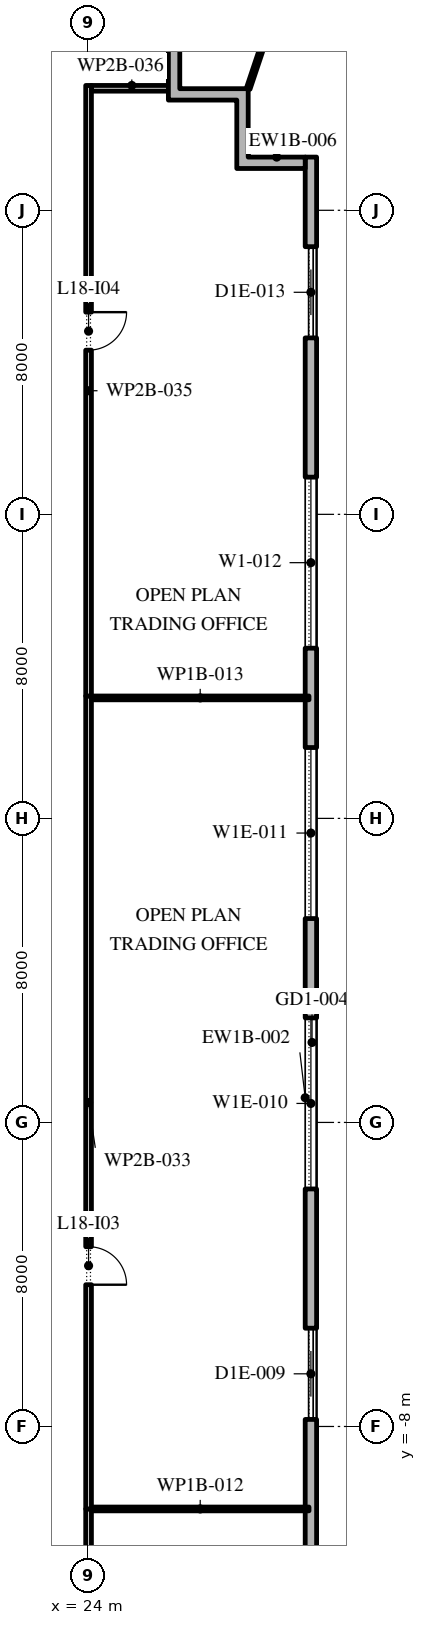
"""IFC4 building model, lengths in metres.
Left out: names, types, materials, properties, quantities, classifications, styles, units other than length and angle.
Written with IfcOpenShell. Run it as: python <this file> out.ifc"""

import sys

from ifc_helpers import new_model, si_unit, direction, frame, frame_2d, origin, place, context, subcontext, project, spatial, polyline, rectangle, outline, extrude, element, fill, save


model = new_model("IFC4")
c1 = context("Model", 3, precision=1e-05, world=origin(), true_north=direction((0.0, 1.0)))
c2 = subcontext(c1, "Body", "Model", "MODEL_VIEW")
j1 = project(units=[si_unit("LENGTHUNIT", "METRE"), si_unit("PLANEANGLEUNIT", "RADIAN")], contexts=[c1])
p1 = place(None, origin())
s1 = spatial("IfcSite", under=j1, at=p1, CompositionType="ELEMENT")
p2 = place(p1, origin())
s2 = spatial("IfcBuilding", under=s1, at=p2, CompositionType="ELEMENT")
p3 = place(p2, frame((0.0, 0.0, 85.8)))
s3 = spatial("IfcBuildingStorey", under=s2, at=p3, CompositionType="ELEMENT", Elevation=85.8)
p4 = place(p3, frame((29.85, -24.1, 0.0), z_axis=(0.0, 0.0, 1.0), x_axis=(0.0, 1.0, 0.0)))
e1 = element("IfcWall", 1, at=p4, inside=s3, PredefinedType="STANDARD", context=c2, shape_type="SweptSolid", body=[
    extrude(rectangle(XDim=49.5, YDim=0.3, at=frame_2d((24.75, 0.0))), origin(), (0.0, 0.0, 1.0), 3.95),
])
p5 = place(p4, frame((1.157, 0.0, 0.45)))
e2 = element("IfcOpeningElement", 2, at=p5, cuts=e1, PredefinedType="OPENING", context=c2, shape_type="SweptSolid", body=[
    extrude(rectangle(XDim=4.5, YDim=3.05, at=frame_2d((2.25, 1.525))), frame((0.0, 0.16, 0.0), z_axis=(0.0, -1.0, 0.0), x_axis=(1.0, 0.0, 0.0)), (0.0, 0.0, 1.0), 0.32),
])
p6 = place(p4, frame((8.121, 0.0, 0.45)))
e3 = element("IfcOpeningElement", 3, at=p6, cuts=e1, PredefinedType="OPENING", context=c2, shape_type="SweptSolid", body=[
    extrude(rectangle(XDim=4.5, YDim=2.775, at=frame_2d((2.25, 1.387))), frame((0.0, 0.16, 0.0), z_axis=(0.0, -1.0, 0.0), x_axis=(1.0, 0.0, 0.0)), (0.0, 0.0, 1.0), 0.32),
])
p7 = place(p4, frame((16.286, 0.0, 0.0)))
e4 = element("IfcOpeningElement", 4, at=p7, cuts=e1, PredefinedType="OPENING", context=c2, shape_type="SweptSolid", body=[
    extrude(rectangle(XDim=2.4, YDim=3.275, at=frame_2d((1.2, 1.637))), frame((0.0, 0.16, 0.0), z_axis=(0.0, -1.0, 0.0), x_axis=(1.0, 0.0, 0.0)), (0.0, 0.0, 1.0), 0.32),
])
p8 = place(p4, frame((22.35, 0.0, 0.45)))
e5 = element("IfcOpeningElement", 5, at=p8, cuts=e1, PredefinedType="OPENING", context=c2, shape_type="SweptSolid", body=[
    extrude(rectangle(XDim=4.5, YDim=2.825, at=frame_2d((2.25, 1.413))), frame((0.0, 0.16, 0.0), z_axis=(0.0, -1.0, 0.0), x_axis=(1.0, 0.0, 0.0)), (0.0, 0.0, 1.0), 0.32),
])
p9 = place(p4, frame((29.464, 0.0, 0.45)))
e6 = element("IfcOpeningElement", 6, at=p9, cuts=e1, PredefinedType="OPENING", context=c2, shape_type="SweptSolid", body=[
    extrude(rectangle(XDim=4.5, YDim=2.825, at=frame_2d((2.25, 1.413))), frame((0.0, 0.16, 0.0), z_axis=(0.0, -1.0, 0.0), x_axis=(1.0, 0.0, 0.0)), (0.0, 0.0, 1.0), 0.32),
])
p10 = place(p4, frame((36.579, 0.0, 0.45)))
e7 = element("IfcOpeningElement", 7, at=p10, cuts=e1, PredefinedType="OPENING", context=c2, shape_type="SweptSolid", body=[
    extrude(rectangle(XDim=4.5, YDim=3.05, at=frame_2d((2.25, 1.525))), frame((0.0, 0.16, 0.0), z_axis=(0.0, -1.0, 0.0), x_axis=(1.0, 0.0, 0.0)), (0.0, 0.0, 1.0), 0.32),
])
p11 = place(p4, frame((44.743, 0.0, 0.0)))
e8 = element("IfcOpeningElement", 8, at=p11, cuts=e1, PredefinedType="OPENING", context=c2, shape_type="SweptSolid", body=[
    extrude(rectangle(XDim=2.4, YDim=3.275, at=frame_2d((1.2, 1.637))), frame((0.0, 0.16, 0.0), z_axis=(0.0, -1.0, 0.0), x_axis=(1.0, 0.0, 0.0)), (0.0, 0.0, 1.0), 0.32),
])
p12 = place(p3, origin())
e9 = element("IfcWall", 9, at=p12, inside=s3, PredefinedType="STANDARD", context=c2, shape_type="SweptSolid", body=[
    extrude(outline(polyline([(27.9, 26.9), (26.1, 26.9), (26.1, 29.0), (26.4, 29.0), (26.4, 27.2), (28.2, 27.2), (28.2, 25.4), (29.7, 25.4), (29.7, 25.1), (27.9, 25.1), (27.9, 26.9)])), origin(), (0.0, 0.0, 1.0), 3.95),
])
p13 = place(p3, frame((28.2, 27.2, -0.05), z_axis=(0.0, 0.0, 1.0), x_axis=(0.318381156621, 0.94796278361, 0.0)))
e10 = element("IfcWall", 10, at=p13, inside=s3, PredefinedType="STANDARD", context=c2, shape_type="SweptSolid", body=[
    extrude(rectangle(XDim=6.528, YDim=0.1, at=frame_2d((3.264, 0.0))), origin(), (0.0, 0.0, 1.0), 4.0),
])
p14 = place(p3, frame((24.0, -10.17, 0.0), z_axis=(0.0, 0.0, 1.0), x_axis=(0.0, -1.0, 0.0)))
e11 = element("IfcWall", 11, at=p14, inside=s3, PredefinedType="PARTITIONING", context=c2, shape_type="SweptSolid", body=[
    extrude(rectangle(XDim=7.755, YDim=0.15, at=frame_2d((3.877, 0.0))), origin(), (0.0, 0.0, 1.0), 3.95),
])
p15 = place(p3, frame((24.075, -10.17, 0.0), z_axis=(0.0, 0.0, 1.0), x_axis=(1.0, 0.0, 0.0)))
e12 = element("IfcWall", 12, at=p15, inside=s3, PredefinedType="PARTITIONING", context=c2, shape_type="SweptSolid", body=[
    extrude(rectangle(XDim=5.725, YDim=0.1, at=frame_2d((2.863, 0.0))), origin(), (0.0, 0.0, 1.0), 3.95),
])
p16 = place(p3, frame((24.0, 11.22, 0.0), z_axis=(0.0, 0.0, 1.0), x_axis=(0.0, -1.0, 0.0)))
e13 = element("IfcWall", 13, at=p16, inside=s3, PredefinedType="PARTITIONING", context=c2, shape_type="SweptSolid", body=[
    extrude(rectangle(XDim=21.39, YDim=0.15, at=frame_2d((10.695, 0.0))), origin(), (0.0, 0.0, 1.0), 3.95),
])
p17 = place(p16, frame((14.49, 0.0, 0.0)))
e14 = element("IfcOpeningElement", 14, at=p17, cuts=e13, PredefinedType="OPENING", context=c2, shape_type="SweptSolid", body=[
    extrude(rectangle(XDim=1.0, YDim=2.1, at=frame_2d((0.5, 1.05))), frame((0.0, 0.085, 0.0), z_axis=(0.0, -1.0, 0.0), x_axis=(1.0, 0.0, 0.0)), (0.0, 0.0, 1.0), 0.17),
])
p18 = place(p3, frame((24.075, 11.17, 0.0), z_axis=(0.0, 0.0, 1.0), x_axis=(1.0, 0.0, 0.0)))
e15 = element("IfcWall", 15, at=p18, inside=s3, PredefinedType="PARTITIONING", context=c2, shape_type="SweptSolid", body=[
    extrude(rectangle(XDim=5.725, YDim=0.1, at=frame_2d((2.863, 0.0))), origin(), (0.0, 0.0, 1.0), 3.95),
])
p19 = place(p3, frame((24.0, 27.285, 0.0), z_axis=(0.0, 0.0, 1.0), x_axis=(0.0, -1.0, 0.0)))
e16 = element("IfcWall", 16, at=p19, inside=s3, PredefinedType="PARTITIONING", context=c2, shape_type="SweptSolid", body=[
    extrude(rectangle(XDim=16.065, YDim=0.15, at=frame_2d((8.032, 0.0))), origin(), (0.0, 0.0, 1.0), 3.95),
])
p20 = place(p19, frame((5.965, 0.0, 0.0)))
e17 = element("IfcOpeningElement", 17, at=p20, cuts=e16, PredefinedType="OPENING", context=c2, shape_type="SweptSolid", body=[
    extrude(rectangle(XDim=1.0, YDim=2.1, at=frame_2d((0.5, 1.05))), frame((0.0, 0.085, 0.0), z_axis=(0.0, -1.0, 0.0), x_axis=(1.0, 0.0, 0.0)), (0.0, 0.0, 1.0), 0.17),
])
p21 = place(p3, frame((26.2, 27.21, 0.0), z_axis=(0.0, 0.0, 1.0), x_axis=(-1.0, 0.0, 0.0)))
e18 = element("IfcWall", 18, at=p21, inside=s3, PredefinedType="PARTITIONING", context=c2, shape_type="SweptSolid", body=[
    extrude(rectangle(XDim=2.125, YDim=0.15, at=frame_2d((1.062, 0.0))), origin(), (0.0, 0.0, 1.0), 3.95),
])
p22 = place(p7, origin())
e19 = element("IfcDoor", 19, at=p22, inside=s3, OperationType="DOUBLE_DOOR_SLIDING", PredefinedType="DOOR", context=c2, shape_type="SweptSolid", body=[
    extrude(rectangle(XDim=2.4, YDim=3.275, at=frame_2d((1.2, 1.637))), frame((0.0, 0.025, 0.0), z_axis=(0.0, -1.0, 0.0), x_axis=(1.0, 0.0, 0.0)), (0.0, 0.0, 1.0), 0.05),
])
fill(e4, e19)
p23 = place(p8, origin())
e20 = element("IfcWindow", 20, at=p23, inside=s3, PartitioningType="DOUBLE_PANEL_VERTICAL", PredefinedType="WINDOW", context=c2, shape_type="SweptSolid", body=[
    extrude(rectangle(XDim=4.5, YDim=2.825, at=frame_2d((2.25, 1.413))), frame((0.0, 0.03, 0.0), z_axis=(0.0, -1.0, 0.0), x_axis=(1.0, 0.0, 0.0)), (0.0, 0.0, 1.0), 0.06),
])
fill(e5, e20)
p24 = place(p9, origin())
e21 = element("IfcWindow", 21, at=p24, inside=s3, PartitioningType="DOUBLE_PANEL_VERTICAL", PredefinedType="WINDOW", context=c2, shape_type="SweptSolid", body=[
    extrude(rectangle(XDim=4.5, YDim=2.825, at=frame_2d((2.25, 1.413))), frame((0.0, 0.03, 0.0), z_axis=(0.0, -1.0, 0.0), x_axis=(1.0, 0.0, 0.0)), (0.0, 0.0, 1.0), 0.06),
])
fill(e6, e21)
p25 = place(p10, origin())
e22 = element("IfcWindow", 22, at=p25, inside=s3, PartitioningType="DOUBLE_PANEL_VERTICAL", PredefinedType="WINDOW", context=c2, shape_type="SweptSolid", body=[
    extrude(rectangle(XDim=4.5, YDim=3.05, at=frame_2d((2.25, 1.525))), frame((0.0, 0.03, 0.0), z_axis=(0.0, -1.0, 0.0), x_axis=(1.0, 0.0, 0.0)), (0.0, 0.0, 1.0), 0.06),
])
fill(e7, e22)
p26 = place(p11, origin())
e23 = element("IfcDoor", 23, at=p26, inside=s3, OperationType="DOUBLE_DOOR_SLIDING", PredefinedType="DOOR", context=c2, shape_type="SweptSolid", body=[
    extrude(rectangle(XDim=2.4, YDim=3.275, at=frame_2d((1.2, 1.637))), frame((0.0, 0.025, 0.0), z_axis=(0.0, -1.0, 0.0), x_axis=(1.0, 0.0, 0.0)), (0.0, 0.0, 1.0), 0.05),
])
fill(e8, e23)
p27 = place(p17, origin())
e24 = element("IfcDoor", 24, at=p27, inside=s3, OperationType="SINGLE_SWING_LEFT", PredefinedType="DOOR", context=c2, shape_type="SweptSolid", body=[
    extrude(rectangle(XDim=1.0, YDim=2.1, at=frame_2d((0.5, 1.05))), frame((0.0, 0.025, 0.0), z_axis=(0.0, -1.0, 0.0), x_axis=(1.0, 0.0, 0.0)), (0.0, 0.0, 1.0), 0.05),
])
fill(e14, e24)
p28 = place(p20, origin())
e25 = element("IfcDoor", 25, at=p28, inside=s3, OperationType="SINGLE_SWING_RIGHT", PredefinedType="DOOR", context=c2, shape_type="SweptSolid", body=[
    extrude(rectangle(XDim=1.0, YDim=2.1, at=frame_2d((0.5, 1.05))), frame((0.0, 0.025, 0.0), z_axis=(0.0, -1.0, 0.0), x_axis=(1.0, 0.0, 0.0)), (0.0, 0.0, 1.0), 0.05),
])
fill(e17, e25)
save(model, sys.argv[1])
